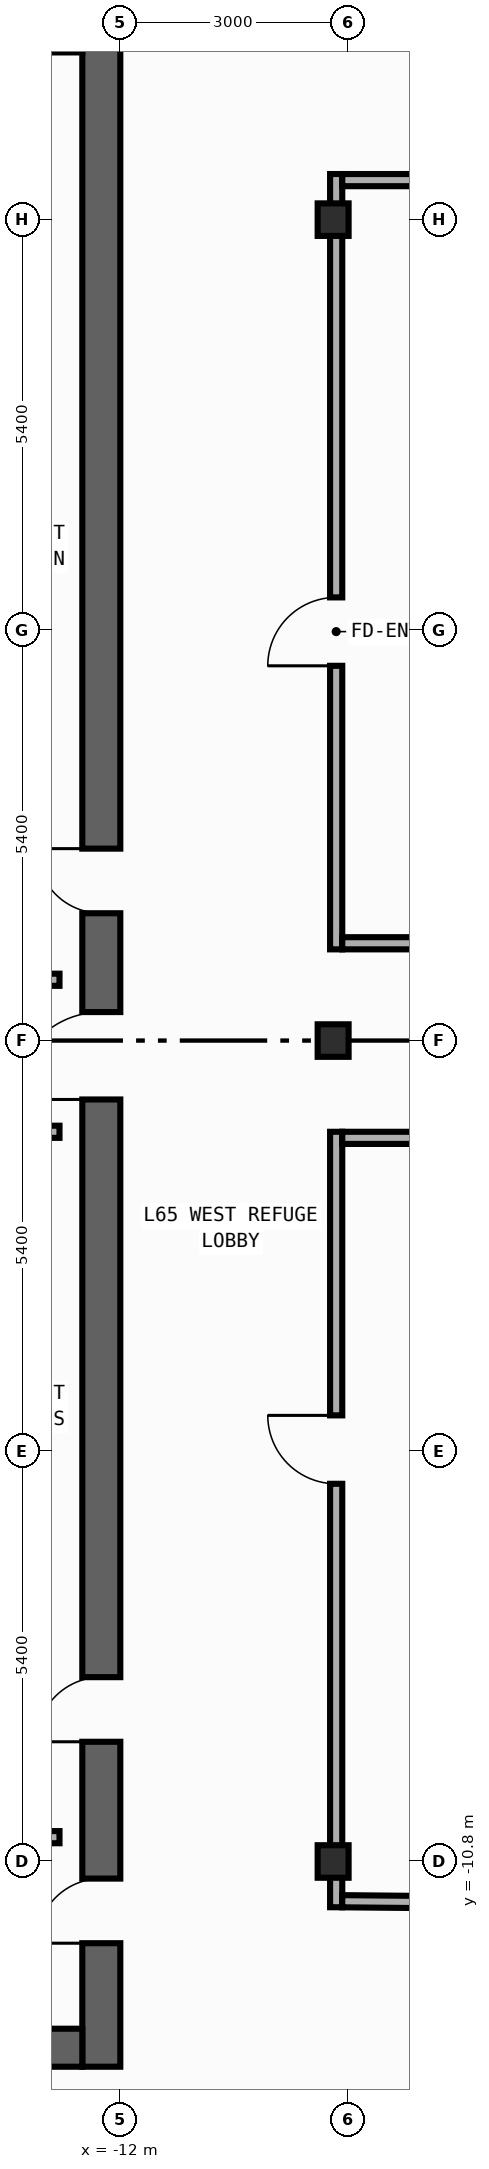
"""IFC4 building model, lengths in metres.
Left out: names, types, materials, properties, quantities, classifications, styles, units other than length and angle.
Written with IfcOpenShell. Run it as: python <this file> out.ifc"""

import sys

from ifc_helpers import new_model, si_unit, direction, frame, frame_2d, origin, origin_2d, place, context, subcontext, project, spatial, rectangle, i_section, extrude, element, fill, save


model = new_model("IFC4")
c1 = context("Model", 3, precision=1e-05, world=origin(), true_north=direction((0.0, 1.0)))
c2 = subcontext(c1, "Body", "Model", "MODEL_VIEW")
j1 = project(units=[si_unit("LENGTHUNIT", "METRE"), si_unit("PLANEANGLEUNIT", "RADIAN")], contexts=[c1])
p1 = place(None, origin())
s1 = spatial("IfcSite", under=j1, at=p1, CompositionType="ELEMENT")
p2 = place(p1, origin())
s2 = spatial("IfcBuilding", under=s1, at=p2, CompositionType="ELEMENT")
p3 = place(p2, frame((0.0, 0.0, 272.8)))
s3 = spatial("IfcBuildingStorey", under=s2, at=p3, CompositionType="ELEMENT", Elevation=272.8)
p4 = place(p3, frame((-12.25, -13.5, 0.0), z_axis=(0.0, 0.0, 1.0), x_axis=(0.0, 1.0, 0.0)))
e1 = element("IfcWall", 1, at=p4, inside=s3, PredefinedType="SHEAR", context=c2, shape_type="SweptSolid", body=[
    extrude(rectangle(XDim=27.0, YDim=0.5, at=frame_2d((13.5, 0.0))), origin(), (0.0, 0.0, 1.0), 4.54),
])
p5 = place(p4, frame((15.175, 0.0, 0.0)))
e2 = element("IfcOpeningElement", 2, at=p5, cuts=e1, PredefinedType="OPENING", context=c2, shape_type="SweptSolid", body=[
    extrude(rectangle(XDim=0.85, YDim=2.1, at=frame_2d((0.425, 1.05))), frame((0.0, 0.26, 0.0), z_axis=(0.0, -1.0, 0.0), x_axis=(1.0, 0.0, 0.0)), (0.0, 0.0, 1.0), 0.52),
])
p6 = place(p4, frame((4.275, 0.0, 0.0)))
e3 = element("IfcOpeningElement", 3, at=p6, cuts=e1, PredefinedType="OPENING", context=c2, shape_type="SweptSolid", body=[
    extrude(rectangle(XDim=0.85, YDim=2.1, at=frame_2d((0.425, 1.05))), frame((0.0, 0.26, 0.0), z_axis=(0.0, -1.0, 0.0), x_axis=(1.0, 0.0, 0.0)), (0.0, 0.0, 1.0), 0.52),
])
p7 = place(p4, frame((12.725, 0.0, 0.0)))
e4 = element("IfcOpeningElement", 4, at=p7, cuts=e1, PredefinedType="OPENING", context=c2, shape_type="SweptSolid", body=[
    extrude(rectangle(XDim=1.15, YDim=2.2, at=frame_2d((0.575, 1.1))), frame((0.0, 0.26, 0.0), z_axis=(0.0, -1.0, 0.0), x_axis=(1.0, 0.0, 0.0)), (0.0, 0.0, 1.0), 0.52),
])
p8 = place(p4, frame((1.625, 0.0, 0.0)))
e5 = element("IfcOpeningElement", 5, at=p8, cuts=e1, PredefinedType="OPENING", context=c2, shape_type="SweptSolid", body=[
    extrude(rectangle(XDim=0.85, YDim=2.1, at=frame_2d((0.425, 1.05))), frame((0.0, 0.26, 0.0), z_axis=(0.0, -1.0, 0.0), x_axis=(1.0, 0.0, 0.0)), (0.0, 0.0, 1.0), 0.52),
])
p9 = place(p3, frame((-19.9, -13.25, 0.0), z_axis=(0.0, 0.0, 1.0), x_axis=(1.0, 0.0, 0.0)))
e6 = element("IfcWall", 6, at=p9, inside=s3, PredefinedType="SHEAR", context=c2, shape_type="SweptSolid", body=[
    extrude(rectangle(XDim=7.4, YDim=0.5, at=frame_2d((3.7, 0.0))), origin(), (0.0, 0.0, 1.0), 4.54),
])
for number, where, z_axis, x_axis in (
    (7, (-9.2, -10.8, 0.0), (0.0, 0.0, 1.0), (1.0, 0.0, 0.0)),
    (8, (-9.2, 0.0, 0.0), (0.0, 0.0, 1.0), (1.0, 0.0, 0.0)),
    (9, (-9.2, 10.8, 0.0), (0.0, 0.0, 1.0), (1.0, 0.0, 0.0)),
):
    element("IfcColumn", number, at=place(p3, frame(where, z_axis=z_axis, x_axis=x_axis)), inside=s3, PredefinedType="COLUMN", context=c2, shape_type="SweptSolid", body=[
        extrude(i_section(OverallWidth=0.407, OverallDepth=0.428, WebThickness=0.02, FlangeThickness=0.035, FilletRadius=0.022, at=origin_2d()), origin(), (0.0, 0.0, 1.0), 4.8),
    ])
for number, where, z_axis, x_axis in (
    (10, (-15.4, 0.8, 0.0), (0.0, 0.0, 1.0), (1.0, 0.0, 0.0)),
    (11, (-15.4, -1.2, 0.0), (0.0, 0.0, 1.0), (1.0, 0.0, 0.0)),
    (12, (-15.4, -10.48, 0.0), (0.0, 0.0, 1.0), (1.0, 0.0, 0.0)),
):
    element("IfcWall", number, at=place(p3, frame(where, z_axis=z_axis, x_axis=x_axis)), inside=s3, PredefinedType="STANDARD", context=c2, shape_type="SweptSolid", body=[
        extrude(rectangle(XDim=2.6, YDim=0.16, at=frame_2d((1.3, 0.0))), origin(), (0.0, 0.0, 1.0), 4.54),
    ])
p10 = place(p3, frame((-9.16, 1.2, 0.0), z_axis=(0.0, 0.0, 1.0), x_axis=(0.0, 1.0, 0.0)))
e13 = element("IfcWall", 13, at=p10, inside=s3, PredefinedType="PARTITIONING", context=c2, shape_type="SweptSolid", body=[
    extrude(rectangle(XDim=10.2, YDim=0.16, at=frame_2d((5.1, 0.0))), origin(), (0.0, 0.0, 1.0), 3.64),
])
p11 = place(p10, frame((3.73, 0.0, 0.0)))
e14 = element("IfcOpeningElement", 14, at=p11, cuts=e13, PredefinedType="OPENING", context=c2, shape_type="SweptSolid", body=[
    extrude(rectangle(XDim=0.9, YDim=2.15, at=frame_2d((0.45, 1.075))), frame((0.0, 0.09, 0.0), z_axis=(0.0, -1.0, 0.0), x_axis=(1.0, 0.0, 0.0)), (0.0, 0.0, 1.0), 0.18),
])
p12 = place(p3, frame((-9.16, -11.402, 0.0), z_axis=(0.0, 0.0, 1.0), x_axis=(0.0, 1.0, 0.0)))
e15 = element("IfcWall", 15, at=p12, inside=s3, PredefinedType="PARTITIONING", context=c2, shape_type="SweptSolid", body=[
    extrude(rectangle(XDim=10.202, YDim=0.16, at=frame_2d((5.101, 0.0))), origin(), (0.0, 0.0, 1.0), 3.64),
])
p13 = place(p12, frame((5.571, 0.0, 0.0)))
e16 = element("IfcOpeningElement", 16, at=p13, cuts=e15, PredefinedType="OPENING", context=c2, shape_type="SweptSolid", body=[
    extrude(rectangle(XDim=0.9, YDim=2.15, at=frame_2d((0.45, 1.075))), frame((0.0, 0.09, 0.0), z_axis=(0.0, -1.0, 0.0), x_axis=(1.0, 0.0, 0.0)), (0.0, 0.0, 1.0), 0.18),
])
p14 = place(p3, frame((-9.08, 1.28, 0.0), z_axis=(0.0, 0.0, 1.0), x_axis=(1.0, 0.0, 0.0)))
e17 = element("IfcWall", 17, at=p14, inside=s3, PredefinedType="PARTITIONING", context=c2, shape_type="SweptSolid", body=[
    extrude(rectangle(XDim=7.96, YDim=0.16, at=frame_2d((3.98, 0.0))), origin(), (0.0, 0.0, 1.0), 4.54),
])
p15 = place(p14, frame((6.6, 0.0, 0.0)))
e18 = element("IfcOpeningElement", 18, at=p15, cuts=e17, PredefinedType="OPENING", context=c2, shape_type="SweptSolid", body=[
    extrude(rectangle(XDim=0.9, YDim=2.15, at=frame_2d((0.45, 1.075))), frame((0.0, 0.09, 0.0), z_axis=(0.0, -1.0, 0.0), x_axis=(1.0, 0.0, 0.0)), (0.0, 0.0, 1.0), 0.18),
])
p16 = place(p3, frame((-9.08, -1.28, 0.0), z_axis=(0.0, 0.0, 1.0), x_axis=(1.0, 0.0, 0.0)))
e19 = element("IfcWall", 19, at=p16, inside=s3, PredefinedType="PARTITIONING", context=c2, shape_type="SweptSolid", body=[
    extrude(rectangle(XDim=7.88, YDim=0.16, at=frame_2d((3.94, 0.0))), origin(), (0.0, 0.0, 1.0), 4.54),
])
p17 = place(p16, frame((6.52, 0.0, 0.0)))
e20 = element("IfcOpeningElement", 20, at=p17, cuts=e19, PredefinedType="OPENING", context=c2, shape_type="SweptSolid", body=[
    extrude(rectangle(XDim=0.9, YDim=2.15, at=frame_2d((0.45, 1.075))), frame((0.0, 0.09, 0.0), z_axis=(0.0, -1.0, 0.0), x_axis=(1.0, 0.0, 0.0)), (0.0, 0.0, 1.0), 0.18),
])
p18 = place(p3, frame((-9.08, 11.32, 0.0), z_axis=(0.0, 0.0, 1.0), x_axis=(1.0, 0.0, 0.0)))
e21 = element("IfcWall", 21, at=p18, inside=s3, PredefinedType="PARTITIONING", context=c2, shape_type="SweptSolid", body=[
    extrude(rectangle(XDim=7.96, YDim=0.16, at=frame_2d((3.98, 0.0))), origin(), (0.0, 0.0, 1.0), 4.54),
])
p19 = place(p3, frame((-9.08, -11.323, 0.0), z_axis=(0.0, 0.0, 1.0), x_axis=(0.999951089988, -0.009890279647, 0.0)))
e22 = element("IfcWall", 22, at=p19, inside=s3, PredefinedType="PARTITIONING", context=c2, shape_type="SweptSolid", body=[
    extrude(rectangle(XDim=7.801, YDim=0.16, at=frame_2d((3.9, 0.0))), origin(), (0.0, 0.0, 1.0), 4.54),
])
p20 = place(p5, origin())
e23 = element("IfcDoor", 23, at=p20, inside=s3, OperationType="SINGLE_SWING_RIGHT", PredefinedType="DOOR", context=c2, shape_type="SweptSolid", body=[
    extrude(rectangle(XDim=0.85, YDim=2.1, at=frame_2d((0.425, 1.05))), frame((0.0, 0.025, 0.0), z_axis=(0.0, -1.0, 0.0), x_axis=(1.0, 0.0, 0.0)), (0.0, 0.0, 1.0), 0.05),
])
fill(e2, e23)
p21 = place(p6, origin())
e24 = element("IfcDoor", 24, at=p21, inside=s3, OperationType="SINGLE_SWING_LEFT", PredefinedType="DOOR", context=c2, shape_type="SweptSolid", body=[
    extrude(rectangle(XDim=0.85, YDim=2.1, at=frame_2d((0.425, 1.05))), frame((0.0, 0.025, 0.0), z_axis=(0.0, -1.0, 0.0), x_axis=(1.0, 0.0, 0.0)), (0.0, 0.0, 1.0), 0.05),
])
fill(e3, e24)
p22 = place(p7, origin())
e25 = element("IfcDoor", 25, at=p22, inside=s3, OperationType="SINGLE_SWING_LEFT", PredefinedType="DOOR", context=c2, shape_type="SweptSolid", body=[
    extrude(rectangle(XDim=1.15, YDim=2.2, at=frame_2d((0.575, 1.1))), frame((0.0, 0.025, 0.0), z_axis=(0.0, -1.0, 0.0), x_axis=(1.0, 0.0, 0.0)), (0.0, 0.0, 1.0), 0.05),
])
fill(e4, e25)
p23 = place(p8, origin())
e26 = element("IfcDoor", 26, at=p23, inside=s3, OperationType="SINGLE_SWING_LEFT", PredefinedType="DOOR", context=c2, shape_type="SweptSolid", body=[
    extrude(rectangle(XDim=0.85, YDim=2.1, at=frame_2d((0.425, 1.05))), frame((0.0, 0.025, 0.0), z_axis=(0.0, -1.0, 0.0), x_axis=(1.0, 0.0, 0.0)), (0.0, 0.0, 1.0), 0.05),
])
fill(e5, e26)
p24 = place(p11, origin())
e27 = element("IfcDoor", 27, at=p24, inside=s3, OperationType="SINGLE_SWING_LEFT", PredefinedType="DOOR", context=c2, shape_type="SweptSolid", body=[
    extrude(rectangle(XDim=0.9, YDim=2.15, at=frame_2d((0.45, 1.075))), frame((0.0, 0.025, 0.0), z_axis=(0.0, -1.0, 0.0), x_axis=(1.0, 0.0, 0.0)), (0.0, 0.0, 1.0), 0.05),
])
fill(e14, e27)
p25 = place(p13, origin())
e28 = element("IfcDoor", 28, at=p25, inside=s3, OperationType="SINGLE_SWING_RIGHT", PredefinedType="DOOR", context=c2, shape_type="SweptSolid", body=[
    extrude(rectangle(XDim=0.9, YDim=2.15, at=frame_2d((0.45, 1.075))), frame((0.0, 0.025, 0.0), z_axis=(0.0, -1.0, 0.0), x_axis=(1.0, 0.0, 0.0)), (0.0, 0.0, 1.0), 0.05),
])
fill(e16, e28)
save(model, sys.argv[1])
